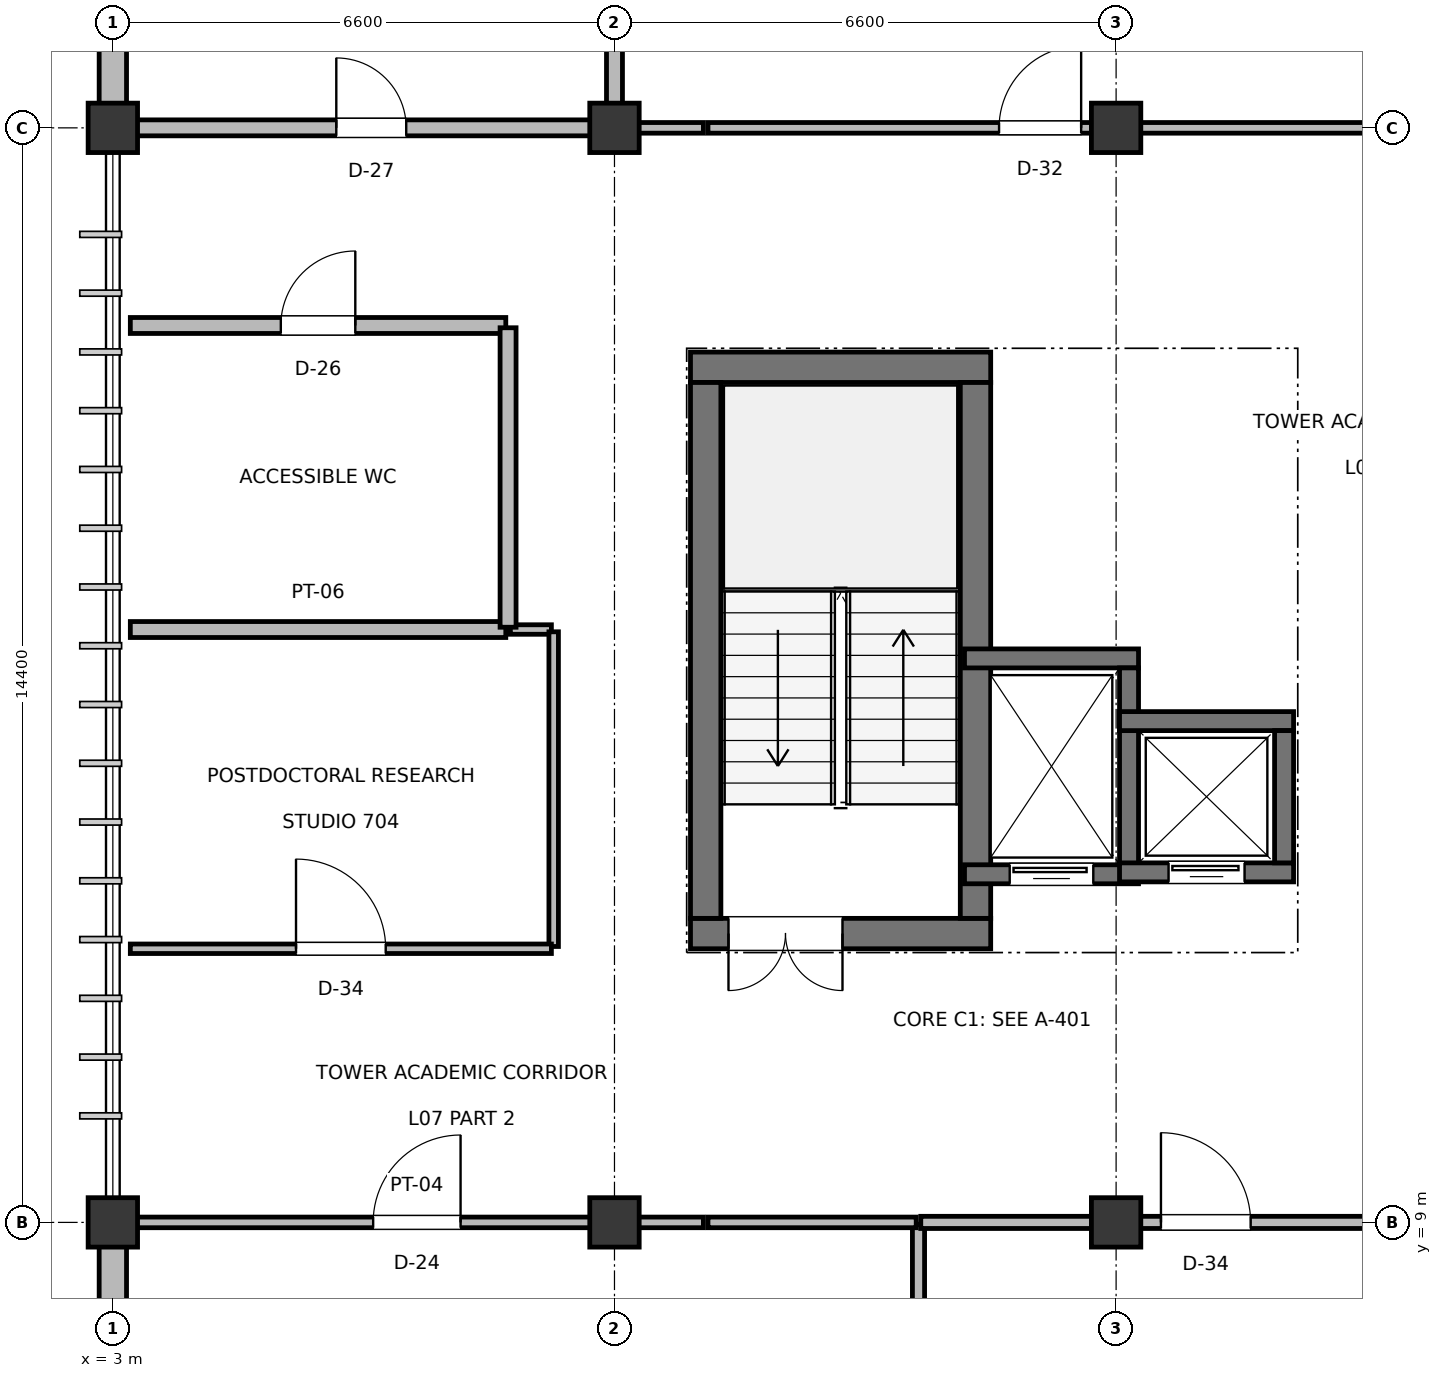
"""IFC4 building model, lengths in metres.
Left out: names, types, materials, properties, quantities, classifications, styles, units other than length and angle.
Written with IfcOpenShell. Run it as: python <this file> out.ifc"""

import sys

from ifc_helpers import new_model, si_unit, direction, frame, frame_2d, origin, origin_2d, place, context, subcontext, project, spatial, rectangle, extrude, element, fill, save


model = new_model("IFC4")
c1 = context("Model", 3, precision=1e-05, world=origin(), true_north=direction((0.0, 1.0)))
c2 = subcontext(c1, "Body", "Model", "MODEL_VIEW")
j1 = project(units=[si_unit("LENGTHUNIT", "METRE"), si_unit("PLANEANGLEUNIT", "RADIAN")], contexts=[c1])
p1 = place(None, origin())
s1 = spatial("IfcSite", under=j1, at=p1, CompositionType="ELEMENT")
p2 = place(p1, origin())
s2 = spatial("IfcBuilding", under=s1, at=p2, CompositionType="ELEMENT")
p3 = place(p2, frame((0.0, 0.0, 33.0)))
s3 = spatial("IfcBuildingStorey", under=s2, at=p3, CompositionType="ELEMENT", Elevation=33.0)
for number, where, z_axis, x_axis in (
    (1, (3.0, 9.0, 0.0), (0.0, 0.0, 1.0), (1.0, 0.0, 0.0)),
    (2, (3.0, 23.4, 0.0), (0.0, 0.0, 1.0), (1.0, 0.0, 0.0)),
    (3, (9.6, 9.0, 0.0), (0.0, 0.0, 1.0), (1.0, 0.0, 0.0)),
    (4, (9.6, 23.4, 0.0), (0.0, 0.0, 1.0), (1.0, 0.0, 0.0)),
    (5, (16.2, 9.0, 0.0), (0.0, 0.0, 1.0), (1.0, 0.0, 0.0)),
    (6, (16.2, 23.4, 0.0), (0.0, 0.0, 1.0), (1.0, 0.0, 0.0)),
):
    element("IfcColumn", number, at=place(p3, frame(where, z_axis=z_axis, x_axis=x_axis)), inside=s3, PredefinedType="COLUMN", context=c2, shape_type="SweptSolid", body=[
        extrude(rectangle(XDim=0.65, YDim=0.65, at=origin_2d()), origin(), (0.0, 0.0, 1.0), 3.8),
    ])
p4 = place(p3, frame((3.0, 3.305, 0.0), z_axis=(0.0, 0.0, 1.0), x_axis=(0.0, 1.0, 0.0)))
e7 = element("IfcWall", 7, at=p4, inside=s3, PredefinedType="SOLIDWALL", context=c2, shape_type="SweptSolid", body=[
    extrude(rectangle(XDim=5.38, YDim=0.36, at=frame_2d((2.69, 0.0))), origin(), (0.0, 0.0, 1.0), 2.875),
])
p5 = place(p4, frame((2.215, 0.0, 0.9)))
e8 = element("IfcOpeningElement", 8, at=p5, cuts=e7, PredefinedType="OPENING", context=c2, shape_type="SweptSolid", body=[
    extrude(rectangle(XDim=0.95, YDim=1.55, at=frame_2d((0.475, 0.775))), frame((0.0, 0.19, 0.0), z_axis=(0.0, -1.0, 0.0), x_axis=(1.0, 0.0, 0.0)), (0.0, 0.0, 1.0), 0.38),
])
p6 = place(p3, frame((3.0, 23.705, 0.0), z_axis=(0.0, 0.0, 1.0), x_axis=(0.0, 1.0, 0.0)))
e9 = element("IfcWall", 9, at=p6, inside=s3, PredefinedType="SOLIDWALL", context=c2, shape_type="SweptSolid", body=[
    extrude(rectangle(XDim=5.99, YDim=0.36, at=frame_2d((2.995, 0.0))), origin(), (0.0, 0.0, 1.0), 2.825),
])
p7 = place(p6, frame((2.52, 0.0, 0.9)))
e10 = element("IfcOpeningElement", 10, at=p7, cuts=e9, PredefinedType="OPENING", context=c2, shape_type="SweptSolid", body=[
    extrude(rectangle(XDim=0.95, YDim=1.75, at=frame_2d((0.475, 0.875))), frame((0.0, 0.19, 0.0), z_axis=(0.0, -1.0, 0.0), x_axis=(1.0, 0.0, 0.0)), (0.0, 0.0, 1.0), 0.38),
])
p8 = place(p3, frame((10.6, 12.8, 0.0), z_axis=(0.0, 0.0, 1.0), x_axis=(1.0, 0.0, 0.0)))
e11 = element("IfcWall", 11, at=p8, inside=s3, PredefinedType="SHEAR", context=c2, shape_type="SweptSolid", body=[
    extrude(rectangle(XDim=3.95, YDim=0.4, at=frame_2d((1.975, 0.0))), origin(), (0.0, 0.0, 1.0), 3.58),
])
p9 = place(p8, frame((0.5, 0.0, 0.0)))
e12 = element("IfcOpeningElement", 12, at=p9, cuts=e11, PredefinedType="OPENING", context=c2, shape_type="SweptSolid", body=[
    extrude(rectangle(XDim=1.5, YDim=2.2, at=frame_2d((0.75, 1.1))), frame((0.0, 0.21, 0.0), z_axis=(0.0, -1.0, 0.0), x_axis=(1.0, 0.0, 0.0)), (0.0, 0.0, 1.0), 0.42),
])
p10 = place(p3, frame((10.6, 20.25, 0.0), z_axis=(0.0, 0.0, 1.0), x_axis=(1.0, 0.0, 0.0)))
e13 = element("IfcWall", 13, at=p10, inside=s3, PredefinedType="SHEAR", context=c2, shape_type="SweptSolid", body=[
    extrude(rectangle(XDim=3.95, YDim=0.4, at=frame_2d((1.975, 0.0))), origin(), (0.0, 0.0, 1.0), 3.58),
])
for number, where, z_axis, x_axis in (
    (14, (10.8, 13.0, 0.0), (0.0, 0.0, 1.0), (0.0, 1.0, 0.0)),
    (15, (14.35, 13.0, 0.0), (0.0, 0.0, 1.0), (0.0, 1.0, 0.0)),
):
    element("IfcWall", number, at=place(p3, frame(where, z_axis=z_axis, x_axis=x_axis)), inside=s3, PredefinedType="SHEAR", context=c2, shape_type="SweptSolid", body=[
        extrude(rectangle(XDim=7.05, YDim=0.4, at=frame_2d((3.525, 0.0))), origin(), (0.0, 0.0, 1.0), 3.58),
    ])
p11 = place(p3, frame((14.205, 13.58, 0.0), z_axis=(0.0, 0.0, 1.0), x_axis=(1.0, 0.0, 0.0)))
e16 = element("IfcWall", 16, at=p11, inside=s3, PredefinedType="SHEAR", context=c2, shape_type="SweptSolid", body=[
    extrude(rectangle(XDim=2.29, YDim=0.25, at=frame_2d((1.145, 0.0))), origin(), (0.0, 0.0, 1.0), 3.56),
])
p12 = place(p11, frame((0.595, 0.0, 0.0)))
e17 = element("IfcOpeningElement", 17, at=p12, cuts=e16, PredefinedType="OPENING", context=c2, shape_type="SweptSolid", body=[
    extrude(rectangle(XDim=1.1, YDim=2.2, at=frame_2d((0.55, 1.1))), frame((0.0, 0.135, 0.0), z_axis=(0.0, -1.0, 0.0), x_axis=(1.0, 0.0, 0.0)), (0.0, 0.0, 1.0), 0.27),
])
p13 = place(p3, frame((14.205, 16.42, 0.0), z_axis=(0.0, 0.0, 1.0), x_axis=(1.0, 0.0, 0.0)))
e18 = element("IfcWall", 18, at=p13, inside=s3, PredefinedType="SHEAR", context=c2, shape_type="SweptSolid", body=[
    extrude(rectangle(XDim=2.29, YDim=0.25, at=frame_2d((1.145, 0.0))), origin(), (0.0, 0.0, 1.0), 3.56),
])
p14 = place(p3, frame((16.37, 13.705, 0.0), z_axis=(0.0, 0.0, 1.0), x_axis=(0.0, 1.0, 0.0)))
e19 = element("IfcWall", 19, at=p14, inside=s3, PredefinedType="SHEAR", context=c2, shape_type="SweptSolid", body=[
    extrude(rectangle(XDim=2.59, YDim=0.25, at=frame_2d((1.295, 0.0))), origin(), (0.0, 0.0, 1.0), 3.56),
])
p15 = place(p3, frame((16.245, 13.605, 0.0), z_axis=(0.0, 0.0, 1.0), x_axis=(1.0, 0.0, 0.0)))
e20 = element("IfcWall", 20, at=p15, inside=s3, PredefinedType="SHEAR", context=c2, shape_type="SweptSolid", body=[
    extrude(rectangle(XDim=2.29, YDim=0.25, at=frame_2d((1.145, 0.0))), origin(), (0.0, 0.0, 1.0), 3.56),
])
p16 = place(p15, frame((0.645, 0.0, 0.0)))
e21 = element("IfcOpeningElement", 21, at=p16, cuts=e20, PredefinedType="OPENING", context=c2, shape_type="SweptSolid", body=[
    extrude(rectangle(XDim=1.0, YDim=2.15, at=frame_2d((0.5, 1.075))), frame((0.0, 0.135, 0.0), z_axis=(0.0, -1.0, 0.0), x_axis=(1.0, 0.0, 0.0)), (0.0, 0.0, 1.0), 0.27),
])
p17 = place(p3, frame((16.245, 15.595, 0.0), z_axis=(0.0, 0.0, 1.0), x_axis=(1.0, 0.0, 0.0)))
e22 = element("IfcWall", 22, at=p17, inside=s3, PredefinedType="SHEAR", context=c2, shape_type="SweptSolid", body=[
    extrude(rectangle(XDim=2.29, YDim=0.25, at=frame_2d((1.145, 0.0))), origin(), (0.0, 0.0, 1.0), 3.56),
])
p18 = place(p3, frame((18.41, 13.73, 0.0), z_axis=(0.0, 0.0, 1.0), x_axis=(0.0, 1.0, 0.0)))
e23 = element("IfcWall", 23, at=p18, inside=s3, PredefinedType="SHEAR", context=c2, shape_type="SweptSolid", body=[
    extrude(rectangle(XDim=1.74, YDim=0.25, at=frame_2d((0.87, 0.0))), origin(), (0.0, 0.0, 1.0), 3.56),
])
p19 = place(p3, frame((13.6, 3.23, 0.0), z_axis=(0.0, 0.0, 1.0), x_axis=(0.0, 1.0, 0.0)))
e24 = element("IfcWall", 24, at=p19, inside=s3, PredefinedType="PARTITIONING", context=c2, shape_type="SweptSolid", body=[
    extrude(rectangle(XDim=5.74, YDim=0.16, at=frame_2d((2.87, 0.0))), origin(), (0.0, 0.0, 1.0), 2.825),
])
p20 = place(p3, frame((3.23, 9.0, 0.0), z_axis=(0.0, 0.0, 1.0), x_axis=(1.0, 0.0, 0.0)))
e25 = element("IfcWall", 25, at=p20, inside=s3, PredefinedType="PARTITIONING", context=c2, shape_type="SweptSolid", body=[
    extrude(rectangle(XDim=7.54, YDim=0.14, at=frame_2d((3.77, 0.0))), origin(), (0.0, 0.0, 1.0), 2.795),
])
p21 = place(p20, frame((3.195, 0.0, 0.0)))
e26 = element("IfcOpeningElement", 26, at=p21, cuts=e25, PredefinedType="OPENING", context=c2, shape_type="SweptSolid", body=[
    extrude(rectangle(XDim=1.15, YDim=2.15, at=frame_2d((0.575, 1.075))), frame((0.0, 0.08, 0.0), z_axis=(0.0, -1.0, 0.0), x_axis=(1.0, 0.0, 0.0)), (0.0, 0.0, 1.0), 0.16),
])
p22 = place(p3, frame((10.83, 9.0, 0.0), z_axis=(0.0, 0.0, 1.0), x_axis=(1.0, 0.0, 0.0)))
e27 = element("IfcWall", 27, at=p22, inside=s3, PredefinedType="PARTITIONING", context=c2, shape_type="SweptSolid", body=[
    extrude(rectangle(XDim=2.74, YDim=0.14, at=frame_2d((1.37, 0.0))), origin(), (0.0, 0.0, 1.0), 2.825),
])
p23 = place(p3, frame((13.63, 9.0, 0.0), z_axis=(0.0, 0.0, 1.0), x_axis=(1.0, 0.0, 0.0)))
e28 = element("IfcWall", 28, at=p23, inside=s3, PredefinedType="PARTITIONING", context=c2, shape_type="SweptSolid", body=[
    extrude(rectangle(XDim=7.14, YDim=0.16, at=frame_2d((3.57, 0.0))), origin(), (0.0, 0.0, 1.0), 2.755),
])
p24 = place(p23, frame((3.16, 0.0, 0.0)))
e29 = element("IfcOpeningElement", 29, at=p24, cuts=e28, PredefinedType="OPENING", context=c2, shape_type="SweptSolid", body=[
    extrude(rectangle(XDim=1.18, YDim=2.2, at=frame_2d((0.59, 1.1))), frame((0.0, 0.09, 0.0), z_axis=(0.0, -1.0, 0.0), x_axis=(1.0, 0.0, 0.0)), (0.0, 0.0, 1.0), 0.18),
])
p25 = place(p3, frame((3.23, 16.8, 0.0), z_axis=(0.0, 0.0, 1.0), x_axis=(1.0, 0.0, 0.0)))
e30 = element("IfcWall", 30, at=p25, inside=s3, PredefinedType="PLUMBINGWALL", context=c2, shape_type="SweptSolid", body=[
    extrude(rectangle(XDim=4.94, YDim=0.21, at=frame_2d((2.47, 0.0))), origin(), (0.0, 0.0, 1.0), 2.875),
])
p26 = place(p3, frame((8.23, 16.8, 0.0), z_axis=(0.0, 0.0, 1.0), x_axis=(1.0, 0.0, 0.0)))
e31 = element("IfcWall", 31, at=p26, inside=s3, PredefinedType="PARTITIONING", context=c2, shape_type="SweptSolid", body=[
    extrude(rectangle(XDim=0.54, YDim=0.125, at=frame_2d((0.27, 0.0))), origin(), (0.0, 0.0, 1.0), 3.48),
])
p27 = place(p3, frame((8.8, 12.63, 0.0), z_axis=(0.0, 0.0, 1.0), x_axis=(0.0, 1.0, 0.0)))
e32 = element("IfcWall", 32, at=p27, inside=s3, PredefinedType="PARTITIONING", context=c2, shape_type="SweptSolid", body=[
    extrude(rectangle(XDim=4.14, YDim=0.125, at=frame_2d((2.07, 0.0))), origin(), (0.0, 0.0, 1.0), 3.48),
])
p28 = place(p3, frame((3.23, 12.6, 0.0), z_axis=(0.0, 0.0, 1.0), x_axis=(1.0, 0.0, 0.0)))
e33 = element("IfcWall", 33, at=p28, inside=s3, PredefinedType="PARTITIONING", context=c2, shape_type="SweptSolid", body=[
    extrude(rectangle(XDim=5.54, YDim=0.125, at=frame_2d((2.77, 0.0))), origin(), (0.0, 0.0, 1.0), 2.875),
])
p29 = place(p28, frame((2.18, 0.0, 0.0)))
e34 = element("IfcOpeningElement", 34, at=p29, cuts=e33, PredefinedType="OPENING", context=c2, shape_type="SweptSolid", body=[
    extrude(rectangle(XDim=1.18, YDim=2.2, at=frame_2d((0.59, 1.1))), frame((0.0, 0.073, 0.0), z_axis=(0.0, -1.0, 0.0), x_axis=(1.0, 0.0, 0.0)), (0.0, 0.0, 1.0), 0.145),
])
p30 = place(p3, frame((3.23, 20.8, 0.0), z_axis=(0.0, 0.0, 1.0), x_axis=(1.0, 0.0, 0.0)))
e35 = element("IfcWall", 35, at=p30, inside=s3, PredefinedType="PLUMBINGWALL", context=c2, shape_type="SweptSolid", body=[
    extrude(rectangle(XDim=4.94, YDim=0.21, at=frame_2d((2.47, 0.0))), origin(), (0.0, 0.0, 1.0), 2.875),
])
p31 = place(p30, frame((1.98, 0.0, 0.0)))
e36 = element("IfcOpeningElement", 36, at=p31, cuts=e35, PredefinedType="OPENING", context=c2, shape_type="SweptSolid", body=[
    extrude(rectangle(XDim=0.98, YDim=2.1, at=frame_2d((0.49, 1.05))), frame((0.0, 0.115, 0.0), z_axis=(0.0, -1.0, 0.0), x_axis=(1.0, 0.0, 0.0)), (0.0, 0.0, 1.0), 0.23),
])
p32 = place(p3, frame((8.2, 16.83, 0.0), z_axis=(0.0, 0.0, 1.0), x_axis=(0.0, 1.0, 0.0)))
e37 = element("IfcWall", 37, at=p32, inside=s3, PredefinedType="PLUMBINGWALL", context=c2, shape_type="SweptSolid", body=[
    extrude(rectangle(XDim=3.94, YDim=0.21, at=frame_2d((1.97, 0.0))), origin(), (0.0, 0.0, 1.0), 3.48),
])
p33 = place(p3, frame((9.6, 23.43, 0.0), z_axis=(0.0, 0.0, 1.0), x_axis=(0.0, 1.0, 0.0)))
e38 = element("IfcWall", 38, at=p33, inside=s3, PredefinedType="PLUMBINGWALL", context=c2, shape_type="SweptSolid", body=[
    extrude(rectangle(XDim=6.34, YDim=0.21, at=frame_2d((3.17, 0.0))), origin(), (0.0, 0.0, 1.0), 2.875),
])
p34 = place(p3, frame((3.23, 23.4, 0.0), z_axis=(0.0, 0.0, 1.0), x_axis=(1.0, 0.0, 0.0)))
e39 = element("IfcWall", 39, at=p34, inside=s3, PredefinedType="PLUMBINGWALL", context=c2, shape_type="SweptSolid", body=[
    extrude(rectangle(XDim=6.34, YDim=0.21, at=frame_2d((3.17, 0.0))), origin(), (0.0, 0.0, 1.0), 2.665),
])
p35 = place(p34, frame((2.71, 0.0, 0.0)))
e40 = element("IfcOpeningElement", 40, at=p35, cuts=e39, PredefinedType="OPENING", context=c2, shape_type="SweptSolid", body=[
    extrude(rectangle(XDim=0.92, YDim=2.1, at=frame_2d((0.46, 1.05))), frame((0.0, 0.115, 0.0), z_axis=(0.0, -1.0, 0.0), x_axis=(1.0, 0.0, 0.0)), (0.0, 0.0, 1.0), 0.23),
])
p36 = place(p3, frame((9.63, 23.4, 0.0), z_axis=(0.0, 0.0, 1.0), x_axis=(1.0, 0.0, 0.0)))
e41 = element("IfcWall", 41, at=p36, inside=s3, PredefinedType="PARTITIONING", context=c2, shape_type="SweptSolid", body=[
    extrude(rectangle(XDim=1.14, YDim=0.14, at=frame_2d((0.57, 0.0))), origin(), (0.0, 0.0, 1.0), 2.775),
])
p37 = place(p3, frame((10.83, 23.4, 0.0), z_axis=(0.0, 0.0, 1.0), x_axis=(1.0, 0.0, 0.0)))
e42 = element("IfcWall", 42, at=p37, inside=s3, PredefinedType="PARTITIONING", context=c2, shape_type="SweptSolid", body=[
    extrude(rectangle(XDim=8.74, YDim=0.14, at=frame_2d((4.37, 0.0))), origin(), (0.0, 0.0, 1.0), 2.645),
])
p38 = place(p37, frame((3.83, 0.0, 0.0)))
e43 = element("IfcOpeningElement", 43, at=p38, cuts=e42, PredefinedType="OPENING", context=c2, shape_type="SweptSolid", body=[
    extrude(rectangle(XDim=1.08, YDim=2.15, at=frame_2d((0.54, 1.075))), frame((0.0, 0.08, 0.0), z_axis=(0.0, -1.0, 0.0), x_axis=(1.0, 0.0, 0.0)), (0.0, 0.0, 1.0), 0.16),
])
p39 = place(p9, frame((1.5, 0.0, 0.0), z_axis=(0.0, 0.0, 1.0), x_axis=(-1.0, 0.0, 0.0)))
e44 = element("IfcDoor", 44, at=p39, inside=s3, OperationType="DOUBLE_DOOR_SINGLE_SWING", PredefinedType="DOOR", context=c2, shape_type="SweptSolid", body=[
    extrude(rectangle(XDim=1.5, YDim=2.2, at=frame_2d((0.75, 1.1))), frame((0.0, 0.025, 0.0), z_axis=(0.0, -1.0, 0.0), x_axis=(1.0, 0.0, 0.0)), (0.0, 0.0, 1.0), 0.05),
])
fill(e12, e44)
p40 = place(p12, frame((1.1, 0.0, 0.0), z_axis=(0.0, 0.0, 1.0), x_axis=(-1.0, 0.0, 0.0)))
e45 = element("IfcDoor", 45, at=p40, inside=s3, OperationType="SLIDING_TO_LEFT", PredefinedType="DOOR", context=c2, shape_type="SweptSolid", body=[
    extrude(rectangle(XDim=1.1, YDim=2.2, at=frame_2d((0.55, 1.1))), frame((0.0, 0.025, 0.0), z_axis=(0.0, -1.0, 0.0), x_axis=(1.0, 0.0, 0.0)), (0.0, 0.0, 1.0), 0.05),
])
fill(e17, e45)
p41 = place(p16, frame((1.0, 0.0, 0.0), z_axis=(0.0, 0.0, 1.0), x_axis=(-1.0, 0.0, 0.0)))
e46 = element("IfcDoor", 46, at=p41, inside=s3, OperationType="SLIDING_TO_LEFT", PredefinedType="DOOR", context=c2, shape_type="SweptSolid", body=[
    extrude(rectangle(XDim=1.0, YDim=2.15, at=frame_2d((0.5, 1.075))), frame((0.0, 0.025, 0.0), z_axis=(0.0, -1.0, 0.0), x_axis=(1.0, 0.0, 0.0)), (0.0, 0.0, 1.0), 0.05),
])
fill(e21, e46)
p42 = place(p21, origin())
e47 = element("IfcDoor", 47, at=p42, inside=s3, OperationType="SINGLE_SWING_RIGHT", PredefinedType="DOOR", context=c2, shape_type="SweptSolid", body=[
    extrude(rectangle(XDim=1.15, YDim=2.15, at=frame_2d((0.575, 1.075))), frame((0.0, 0.025, 0.0), z_axis=(0.0, -1.0, 0.0), x_axis=(1.0, 0.0, 0.0)), (0.0, 0.0, 1.0), 0.05),
])
fill(e26, e47)
p43 = place(p24, origin())
e48 = element("IfcDoor", 48, at=p43, inside=s3, OperationType="SINGLE_SWING_LEFT", PredefinedType="DOOR", context=c2, shape_type="SweptSolid", body=[
    extrude(rectangle(XDim=1.18, YDim=2.2, at=frame_2d((0.59, 1.1))), frame((0.0, 0.025, 0.0), z_axis=(0.0, -1.0, 0.0), x_axis=(1.0, 0.0, 0.0)), (0.0, 0.0, 1.0), 0.05),
])
fill(e29, e48)
p44 = place(p29, origin())
e49 = element("IfcDoor", 49, at=p44, inside=s3, OperationType="SINGLE_SWING_LEFT", PredefinedType="DOOR", context=c2, shape_type="SweptSolid", body=[
    extrude(rectangle(XDim=1.18, YDim=2.2, at=frame_2d((0.59, 1.1))), frame((0.0, 0.025, 0.0), z_axis=(0.0, -1.0, 0.0), x_axis=(1.0, 0.0, 0.0)), (0.0, 0.0, 1.0), 0.05),
])
fill(e34, e49)
p45 = place(p31, origin())
e50 = element("IfcDoor", 50, at=p45, inside=s3, OperationType="SINGLE_SWING_RIGHT", PredefinedType="DOOR", context=c2, shape_type="SweptSolid", body=[
    extrude(rectangle(XDim=0.98, YDim=2.1, at=frame_2d((0.49, 1.05))), frame((0.0, 0.025, 0.0), z_axis=(0.0, -1.0, 0.0), x_axis=(1.0, 0.0, 0.0)), (0.0, 0.0, 1.0), 0.05),
])
fill(e36, e50)
p46 = place(p35, origin())
e51 = element("IfcDoor", 51, at=p46, inside=s3, OperationType="SINGLE_SWING_LEFT", PredefinedType="DOOR", context=c2, shape_type="SweptSolid", body=[
    extrude(rectangle(XDim=0.92, YDim=2.1, at=frame_2d((0.46, 1.05))), frame((0.0, 0.025, 0.0), z_axis=(0.0, -1.0, 0.0), x_axis=(1.0, 0.0, 0.0)), (0.0, 0.0, 1.0), 0.05),
])
fill(e40, e51)
p47 = place(p38, origin())
e52 = element("IfcDoor", 52, at=p47, inside=s3, OperationType="SINGLE_SWING_RIGHT", PredefinedType="DOOR", context=c2, shape_type="SweptSolid", body=[
    extrude(rectangle(XDim=1.08, YDim=2.15, at=frame_2d((0.54, 1.075))), frame((0.0, 0.025, 0.0), z_axis=(0.0, -1.0, 0.0), x_axis=(1.0, 0.0, 0.0)), (0.0, 0.0, 1.0), 0.05),
])
fill(e43, e52)
save(model, sys.argv[1])
